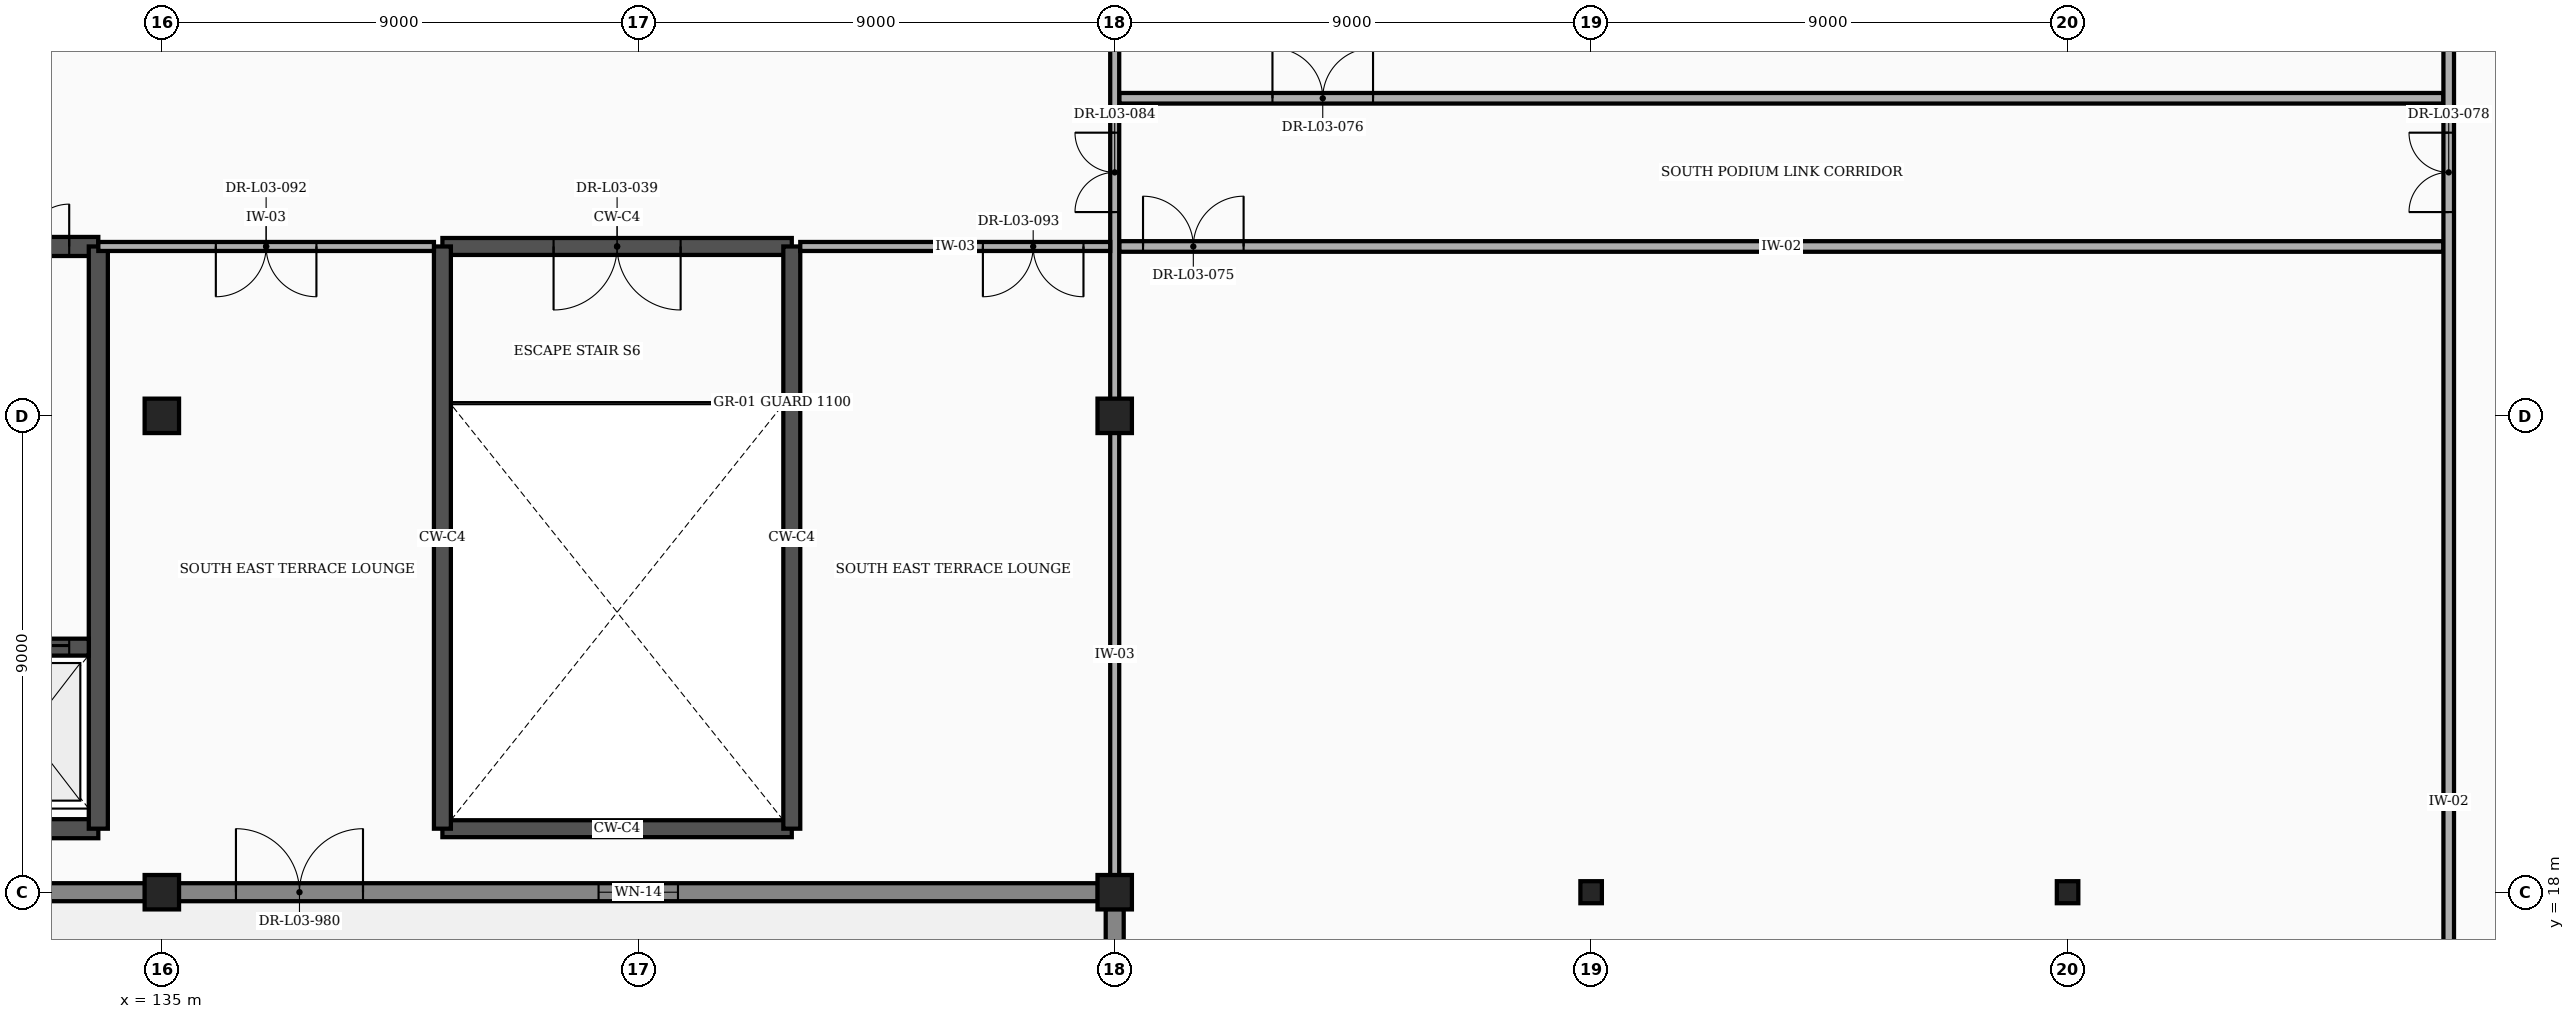
"""IFC4 building model, lengths in metres.
Left out: names, types, materials, properties, quantities, classifications, styles, units other than length and angle.
Written with IfcOpenShell. Run it as: python <this file> out.ifc"""

import sys

from ifc_helpers import new_model, si_unit, direction, frame, frame_2d, origin, origin_2d, place, context, subcontext, project, spatial, rectangle, i_section, extrude, element, fill, save


model = new_model("IFC4")
c1 = context("Model", 3, precision=1e-05, world=origin(), true_north=direction((0.0, 1.0)))
c2 = subcontext(c1, "Body", "Model", "MODEL_VIEW")
j1 = project(units=[si_unit("LENGTHUNIT", "METRE"), si_unit("PLANEANGLEUNIT", "RADIAN")], contexts=[c1])
p1 = place(None, origin())
s1 = spatial("IfcSite", under=j1, at=p1, CompositionType="ELEMENT")
p2 = place(p1, origin())
s2 = spatial("IfcBuilding", under=s1, at=p2, CompositionType="ELEMENT")
p3 = place(p2, frame((0.0, 0.0, 16.8)))
s3 = spatial("IfcBuildingStorey", under=s2, at=p3, CompositionType="ELEMENT", Elevation=16.8)
for number, where, z_axis, x_axis in (
    (1, (135.0, 18.0, 0.0), (0.0, 0.0, 1.0), (1.0, 0.0, 0.0)),
    (2, (135.0, 27.0, 0.0), (0.0, 0.0, 1.0), (1.0, 0.0, 0.0)),
    (3, (153.0, 18.0, 0.0), (0.0, 0.0, 1.0), (1.0, 0.0, 0.0)),
    (4, (153.0, 27.0, 0.0), (0.0, 0.0, 1.0), (1.0, 0.0, 0.0)),
):
    element("IfcColumn", number, at=place(p3, frame(where, z_axis=z_axis, x_axis=x_axis)), inside=s3, PredefinedType="COLUMN", context=c2, shape_type="SweptSolid", body=[
        extrude(rectangle(XDim=0.65, YDim=0.65, at=origin_2d()), origin(), (0.0, 0.0, 1.0), 4.8),
    ])
for number, where, z_axis, x_axis in (
    (5, (162.0, 18.0, 0.0), (0.0, 0.0, 1.0), (1.0, 0.0, 0.0)),
    (6, (171.0, 18.0, 0.0), (0.0, 0.0, 1.0), (1.0, 0.0, 0.0)),
):
    element("IfcColumn", number, at=place(p3, frame(where, z_axis=z_axis, x_axis=x_axis)), inside=s3, PredefinedType="COLUMN", context=c2, shape_type="SweptSolid", body=[
        extrude(i_section(OverallWidth=0.406, OverallDepth=0.416, WebThickness=0.03, FlangeThickness=0.048, at=origin_2d()), origin(), (0.0, 0.0, 1.0), 4.8),
    ])
p4 = place(p3, frame((117.317, 18.0, 0.0), z_axis=(0.0, 0.0, 1.0), x_axis=(1.0, 0.0, 0.0)))
e7 = element("IfcWall", 7, at=p4, inside=s3, PredefinedType="STANDARD", context=c2, shape_type="SweptSolid", body=[
    extrude(rectangle(XDim=17.366, YDim=0.34, at=frame_2d((8.683, 0.0))), origin(), (0.0, 0.0, 1.0), 4.195),
])
p5 = place(p4, frame((7.933, 0.0, 0.85)))
e8 = element("IfcOpeningElement", 8, at=p5, cuts=e7, PredefinedType="OPENING", context=c2, shape_type="SweptSolid", body=[
    extrude(rectangle(XDim=1.5, YDim=1.8, at=frame_2d((0.75, 0.9))), frame((0.0, 0.182, 0.0), z_axis=(0.0, -1.0, 0.0), x_axis=(1.0, 0.0, 0.0)), (0.0, 0.0, 1.0), 0.364),
])
p6 = place(p3, frame((135.317, 18.0, 0.0), z_axis=(0.0, 0.0, 1.0), x_axis=(1.0, 0.0, 0.0)))
e9 = element("IfcWall", 9, at=p6, inside=s3, PredefinedType="STANDARD", context=c2, shape_type="SweptSolid", body=[
    extrude(rectangle(XDim=17.366, YDim=0.34, at=frame_2d((8.683, 0.0))), origin(), (0.0, 0.0, 1.0), 4.195),
])
p7 = place(p6, frame((7.933, 0.0, 0.85)))
e10 = element("IfcOpeningElement", 10, at=p7, cuts=e9, PredefinedType="OPENING", context=c2, shape_type="SweptSolid", body=[
    extrude(rectangle(XDim=1.5, YDim=1.8, at=frame_2d((0.75, 0.9))), frame((0.0, 0.182, 0.0), z_axis=(0.0, -1.0, 0.0), x_axis=(1.0, 0.0, 0.0)), (0.0, 0.0, 1.0), 0.364),
])
p8 = place(p6, frame((1.083, 0.0, 0.0)))
e11 = element("IfcOpeningElement", 11, at=p8, cuts=e9, PredefinedType="OPENING", context=c2, shape_type="SweptSolid", body=[
    extrude(rectangle(XDim=2.4, YDim=2.35, at=frame_2d((1.2, 1.175))), frame((0.0, 0.182, 0.0), z_axis=(0.0, -1.0, 0.0), x_axis=(1.0, 0.0, 0.0)), (0.0, 0.0, 1.0), 0.364),
])
p9 = place(p3, frame((153.0, 9.317, 0.0), z_axis=(0.0, 0.0, 1.0), x_axis=(0.0, 1.0, 0.0)))
e12 = element("IfcWall", 12, at=p9, inside=s3, PredefinedType="STANDARD", context=c2, shape_type="SweptSolid", body=[
    extrude(rectangle(XDim=8.366, YDim=0.34, at=frame_2d((4.183, 0.0))), origin(), (0.0, 0.0, 1.0), 4.555),
])
p10 = place(p9, frame((2.583, 0.0, 0.85)))
e13 = element("IfcOpeningElement", 13, at=p10, cuts=e12, PredefinedType="OPENING", context=c2, shape_type="SweptSolid", body=[
    extrude(rectangle(XDim=3.2, YDim=2.2, at=frame_2d((1.6, 1.1))), frame((0.0, 0.182, 0.0), z_axis=(0.0, -1.0, 0.0), x_axis=(1.0, 0.0, 0.0)), (0.0, 0.0, 1.0), 0.364),
])
p11 = place(p3, frame((127.2, 19.2, 0.0), z_axis=(0.0, 0.0, 1.0), x_axis=(1.0, 0.0, 0.0)))
e14 = element("IfcWall", 14, at=p11, inside=s3, PredefinedType="SHEAR", context=c2, shape_type="SweptSolid", body=[
    extrude(rectangle(XDim=6.6, YDim=0.36, at=frame_2d((3.3, 0.0))), origin(), (0.0, 0.0, 1.0), 4.555),
])
p12 = place(p3, frame((127.2, 30.2, 0.0), z_axis=(0.0, 0.0, 1.0), x_axis=(1.0, 0.0, 0.0)))
e15 = element("IfcWall", 15, at=p12, inside=s3, PredefinedType="SHEAR", context=c2, shape_type="SweptSolid", body=[
    extrude(rectangle(XDim=6.6, YDim=0.36, at=frame_2d((3.3, 0.0))), origin(), (0.0, 0.0, 1.0), 4.555),
])
p13 = place(p12, frame((4.45, 0.0, 0.0)))
e16 = element("IfcOpeningElement", 16, at=p13, cuts=e15, PredefinedType="OPENING", context=c2, shape_type="SweptSolid", body=[
    extrude(rectangle(XDim=1.6, YDim=2.3, at=frame_2d((0.8, 1.15))), frame((0.0, 0.192, 0.0), z_axis=(0.0, -1.0, 0.0), x_axis=(1.0, 0.0, 0.0)), (0.0, 0.0, 1.0), 0.384),
])
p14 = place(p3, frame((133.8, 19.2, 0.0), z_axis=(0.0, 0.0, 1.0), x_axis=(0.0, 1.0, 0.0)))
e17 = element("IfcWall", 17, at=p14, inside=s3, PredefinedType="SHEAR", context=c2, shape_type="SweptSolid", body=[
    extrude(rectangle(XDim=11.0, YDim=0.36, at=frame_2d((5.5, 0.0))), origin(), (0.0, 0.0, 1.0), 4.555),
])
p15 = place(p3, frame((131.3, 22.63, 0.0), z_axis=(0.0, 0.0, 1.0), x_axis=(1.0, 0.0, 0.0)))
e18 = element("IfcWall", 18, at=p15, inside=s3, PredefinedType="SHEAR", context=c2, shape_type="SweptSolid", body=[
    extrude(rectangle(XDim=2.32, YDim=0.32, at=frame_2d((1.16, 0.0))), origin(), (0.0, 0.0, 1.0), 4.555),
])
p16 = place(p15, frame((0.3, 0.0, 0.0)))
e19 = element("IfcOpeningElement", 19, at=p16, cuts=e18, PredefinedType="OPENING", context=c2, shape_type="SweptSolid", body=[
    extrude(rectangle(XDim=1.65, YDim=2.35, at=frame_2d((0.825, 1.175))), frame((0.0, 0.172, 0.0), z_axis=(0.0, -1.0, 0.0), x_axis=(1.0, 0.0, 0.0)), (0.0, 0.0, 1.0), 0.344),
])
p17 = place(p3, frame((140.3, 19.2, 0.0), z_axis=(0.0, 0.0, 1.0), x_axis=(1.0, 0.0, 0.0)))
e20 = element("IfcWall", 20, at=p17, inside=s3, PredefinedType="SHEAR", context=c2, shape_type="SweptSolid", body=[
    extrude(rectangle(XDim=6.6, YDim=0.32, at=frame_2d((3.3, 0.0))), origin(), (0.0, 0.0, 1.0), 4.555),
])
p18 = place(p3, frame((140.3, 30.2, 0.0), z_axis=(0.0, 0.0, 1.0), x_axis=(1.0, 0.0, 0.0)))
e21 = element("IfcWall", 21, at=p18, inside=s3, PredefinedType="SHEAR", context=c2, shape_type="SweptSolid", body=[
    extrude(rectangle(XDim=6.6, YDim=0.32, at=frame_2d((3.3, 0.0))), origin(), (0.0, 0.0, 1.0), 4.555),
])
p19 = place(p18, frame((2.1, 0.0, 0.0)))
e22 = element("IfcOpeningElement", 22, at=p19, cuts=e21, PredefinedType="OPENING", context=c2, shape_type="SweptSolid", body=[
    extrude(rectangle(XDim=2.4, YDim=2.25, at=frame_2d((1.2, 1.125))), frame((0.0, 0.172, 0.0), z_axis=(0.0, -1.0, 0.0), x_axis=(1.0, 0.0, 0.0)), (0.0, 0.0, 1.0), 0.344),
])
for number, where, z_axis, x_axis in (
    (23, (140.3, 19.2, 0.0), (0.0, 0.0, 1.0), (0.0, 1.0, 0.0)),
    (24, (146.9, 19.2, 0.0), (0.0, 0.0, 1.0), (0.0, 1.0, 0.0)),
):
    element("IfcWall", number, at=place(p3, frame(where, z_axis=z_axis, x_axis=x_axis)), inside=s3, PredefinedType="SHEAR", context=c2, shape_type="SweptSolid", body=[
        extrude(rectangle(XDim=11.0, YDim=0.32, at=frame_2d((5.5, 0.0))), origin(), (0.0, 0.0, 1.0), 4.555),
    ])
p20 = place(p3, frame((153.085, 30.2, 0.0), z_axis=(0.0, 0.0, 1.0), x_axis=(1.0, 0.0, 0.0)))
e25 = element("IfcWall", 25, at=p20, inside=s3, PredefinedType="PARTITIONING", context=c2, shape_type="SweptSolid", body=[
    extrude(rectangle(XDim=25.015, YDim=0.2, at=frame_2d((12.508, 0.0))), origin(), (0.0, 0.0, 1.0), 4.555),
])
p21 = place(p20, frame((0.45, 0.0, 0.0)))
e26 = element("IfcOpeningElement", 26, at=p21, cuts=e25, PredefinedType="OPENING", context=c2, shape_type="SweptSolid", body=[
    extrude(rectangle(XDim=1.9, YDim=2.35, at=frame_2d((0.95, 1.175))), frame((0.0, 0.112, 0.0), z_axis=(0.0, -1.0, 0.0), x_axis=(1.0, 0.0, 0.0)), (0.0, 0.0, 1.0), 0.224),
])
p22 = place(p3, frame((153.085, 33.0, 0.0), z_axis=(0.0, 0.0, 1.0), x_axis=(1.0, 0.0, 0.0)))
e27 = element("IfcWall", 27, at=p22, inside=s3, PredefinedType="PARTITIONING", context=c2, shape_type="SweptSolid", body=[
    extrude(rectangle(XDim=25.015, YDim=0.2, at=frame_2d((12.508, 0.0))), origin(), (0.0, 0.0, 1.0), 4.555),
])
p23 = place(p22, frame((2.895, 0.0, 0.0)))
e28 = element("IfcOpeningElement", 28, at=p23, cuts=e27, PredefinedType="OPENING", context=c2, shape_type="SweptSolid", body=[
    extrude(rectangle(XDim=1.9, YDim=2.35, at=frame_2d((0.95, 1.175))), frame((0.0, 0.112, 0.0), z_axis=(0.0, -1.0, 0.0), x_axis=(1.0, 0.0, 0.0)), (0.0, 0.0, 1.0), 0.224),
])
p24 = place(p3, frame((178.2, 0.17, 0.0), z_axis=(0.0, 0.0, 1.0), x_axis=(0.0, 1.0, 0.0)))
e29 = element("IfcWall", 29, at=p24, inside=s3, PredefinedType="PARTITIONING", context=c2, shape_type="SweptSolid", body=[
    extrude(rectangle(XDim=39.07, YDim=0.2, at=frame_2d((19.535, 0.0))), origin(), (0.0, 0.0, 1.0), 4.555),
])
p25 = place(p24, frame((13.98, 0.0, 0.0)))
e30 = element("IfcOpeningElement", 30, at=p25, cuts=e29, PredefinedType="OPENING", context=c2, shape_type="SweptSolid", body=[
    extrude(rectangle(XDim=1.9, YDim=2.35, at=frame_2d((0.95, 1.175))), frame((0.0, 0.112, 0.0), z_axis=(0.0, -1.0, 0.0), x_axis=(1.0, 0.0, 0.0)), (0.0, 0.0, 1.0), 0.224),
])
p26 = place(p24, frame((30.68, 0.0, 0.0)))
e31 = element("IfcOpeningElement", 31, at=p26, cuts=e29, PredefinedType="OPENING", context=c2, shape_type="SweptSolid", body=[
    extrude(rectangle(XDim=1.5, YDim=2.2, at=frame_2d((0.75, 1.1))), frame((0.0, 0.112, 0.0), z_axis=(0.0, -1.0, 0.0), x_axis=(1.0, 0.0, 0.0)), (0.0, 0.0, 1.0), 0.224),
])
p27 = place(p24, frame((36.68, 0.0, 0.0)))
e32 = element("IfcOpeningElement", 32, at=p27, cuts=e29, PredefinedType="OPENING", context=c2, shape_type="SweptSolid", body=[
    extrude(rectangle(XDim=1.9, YDim=2.35, at=frame_2d((0.95, 1.175))), frame((0.0, 0.112, 0.0), z_axis=(0.0, -1.0, 0.0), x_axis=(1.0, 0.0, 0.0)), (0.0, 0.0, 1.0), 0.224),
])
p28 = place(p3, frame((153.0, 18.22, 0.0), z_axis=(0.0, 0.0, 1.0), x_axis=(0.0, 1.0, 0.0)))
e33 = element("IfcWall", 33, at=p28, inside=s3, PredefinedType="PARTITIONING", context=c2, shape_type="SweptSolid", body=[
    extrude(rectangle(XDim=8.56, YDim=0.17, at=frame_2d((4.28, 0.0))), origin(), (0.0, 0.0, 1.0), 4.002),
])
p29 = place(p3, frame((153.0, 27.22, 0.0), z_axis=(0.0, 0.0, 1.0), x_axis=(0.0, 1.0, 0.0)))
e34 = element("IfcWall", 34, at=p29, inside=s3, PredefinedType="PARTITIONING", context=c2, shape_type="SweptSolid", body=[
    extrude(rectangle(XDim=8.56, YDim=0.17, at=frame_2d((4.28, 0.0))), origin(), (0.0, 0.0, 1.0), 4.258),
])
p30 = place(p29, frame((3.63, 0.0, 0.0)))
e35 = element("IfcOpeningElement", 35, at=p30, cuts=e34, PredefinedType="OPENING", context=c2, shape_type="SweptSolid", body=[
    extrude(rectangle(XDim=1.5, YDim=2.2, at=frame_2d((0.75, 1.1))), frame((0.0, 0.097, 0.0), z_axis=(0.0, -1.0, 0.0), x_axis=(1.0, 0.0, 0.0)), (0.0, 0.0, 1.0), 0.194),
])
p31 = place(p3, frame((133.8, 30.2, 0.0), z_axis=(0.0, 0.0, 1.0), x_axis=(1.0, 0.0, 0.0)))
e36 = element("IfcWall", 36, at=p31, inside=s3, PredefinedType="PARTITIONING", context=c2, shape_type="SweptSolid", body=[
    extrude(rectangle(XDim=6.34, YDim=0.17, at=frame_2d((3.17, 0.0))), origin(), (0.0, 0.0, 1.0), 4.555),
])
p32 = place(p31, frame((2.22, 0.0, 0.0)))
e37 = element("IfcOpeningElement", 37, at=p32, cuts=e36, PredefinedType="OPENING", context=c2, shape_type="SweptSolid", body=[
    extrude(rectangle(XDim=1.9, YDim=2.35, at=frame_2d((0.95, 1.175))), frame((0.0, 0.097, 0.0), z_axis=(0.0, -1.0, 0.0), x_axis=(1.0, 0.0, 0.0)), (0.0, 0.0, 1.0), 0.194),
])
p33 = place(p3, frame((147.06, 30.2, 0.0), z_axis=(0.0, 0.0, 1.0), x_axis=(1.0, 0.0, 0.0)))
e38 = element("IfcWall", 38, at=p33, inside=s3, PredefinedType="PARTITIONING", context=c2, shape_type="SweptSolid", body=[
    extrude(rectangle(XDim=5.855, YDim=0.17, at=frame_2d((2.927, 0.0))), origin(), (0.0, 0.0, 1.0), 4.555),
])
p34 = place(p33, frame((3.45, 0.0, 0.0)))
e39 = element("IfcOpeningElement", 39, at=p34, cuts=e38, PredefinedType="OPENING", context=c2, shape_type="SweptSolid", body=[
    extrude(rectangle(XDim=1.9, YDim=2.35, at=frame_2d((0.95, 1.175))), frame((0.0, 0.097, 0.0), z_axis=(0.0, -1.0, 0.0), x_axis=(1.0, 0.0, 0.0)), (0.0, 0.0, 1.0), 0.194),
])
p35 = place(p7, origin())
e40 = element("IfcWindow", 40, at=p35, inside=s3, PartitioningType="SINGLE_PANEL", PredefinedType="WINDOW", context=c2, shape_type="SweptSolid", body=[
    extrude(rectangle(XDim=1.5, YDim=1.8, at=frame_2d((0.75, 0.9))), frame((0.0, 0.03, 0.0), z_axis=(0.0, -1.0, 0.0), x_axis=(1.0, 0.0, 0.0)), (0.0, 0.0, 1.0), 0.06),
])
fill(e10, e40)
p36 = place(p8, origin())
e41 = element("IfcDoor", 41, at=p36, inside=s3, OperationType="DOUBLE_DOOR_SINGLE_SWING", PredefinedType="DOOR", context=c2, shape_type="SweptSolid", body=[
    extrude(rectangle(XDim=2.4, YDim=2.35, at=frame_2d((1.2, 1.175))), frame((0.0, 0.025, 0.0), z_axis=(0.0, -1.0, 0.0), x_axis=(1.0, 0.0, 0.0)), (0.0, 0.0, 1.0), 0.05),
])
fill(e11, e41)
p37 = place(p16, origin())
e42 = element("IfcDoor", 42, at=p37, inside=s3, OperationType="DOUBLE_DOOR_SLIDING", PredefinedType="DOOR", context=c2, shape_type="SweptSolid", body=[
    extrude(rectangle(XDim=1.65, YDim=2.35, at=frame_2d((0.825, 1.175))), frame((0.0, 0.025, 0.0), z_axis=(0.0, -1.0, 0.0), x_axis=(1.0, 0.0, 0.0)), (0.0, 0.0, 1.0), 0.05),
])
fill(e19, e42)
p38 = place(p13, origin())
e43 = element("IfcDoor", 43, at=p38, inside=s3, OperationType="DOUBLE_DOOR_SINGLE_SWING", PredefinedType="DOOR", context=c2, shape_type="SweptSolid", body=[
    extrude(rectangle(XDim=1.6, YDim=2.3, at=frame_2d((0.8, 1.15))), frame((0.0, 0.025, 0.0), z_axis=(0.0, -1.0, 0.0), x_axis=(1.0, 0.0, 0.0)), (0.0, 0.0, 1.0), 0.05),
])
fill(e16, e43)
p39 = place(p19, frame((2.4, 0.0, 0.0), z_axis=(0.0, 0.0, 1.0), x_axis=(-1.0, 0.0, 0.0)))
e44 = element("IfcDoor", 44, at=p39, inside=s3, OperationType="DOUBLE_DOOR_SINGLE_SWING", PredefinedType="DOOR", context=c2, shape_type="SweptSolid", body=[
    extrude(rectangle(XDim=2.4, YDim=2.25, at=frame_2d((1.2, 1.125))), frame((0.0, 0.025, 0.0), z_axis=(0.0, -1.0, 0.0), x_axis=(1.0, 0.0, 0.0)), (0.0, 0.0, 1.0), 0.05),
])
fill(e22, e44)
p40 = place(p21, origin())
e45 = element("IfcDoor", 45, at=p40, inside=s3, OperationType="DOUBLE_DOOR_SINGLE_SWING", PredefinedType="DOOR", context=c2, shape_type="SweptSolid", body=[
    extrude(rectangle(XDim=1.9, YDim=2.35, at=frame_2d((0.95, 1.175))), frame((0.0, 0.025, 0.0), z_axis=(0.0, -1.0, 0.0), x_axis=(1.0, 0.0, 0.0)), (0.0, 0.0, 1.0), 0.05),
])
fill(e26, e45)
p41 = place(p23, origin())
e46 = element("IfcDoor", 46, at=p41, inside=s3, OperationType="DOUBLE_DOOR_SINGLE_SWING", PredefinedType="DOOR", context=c2, shape_type="SweptSolid", body=[
    extrude(rectangle(XDim=1.9, YDim=2.35, at=frame_2d((0.95, 1.175))), frame((0.0, 0.025, 0.0), z_axis=(0.0, -1.0, 0.0), x_axis=(1.0, 0.0, 0.0)), (0.0, 0.0, 1.0), 0.05),
])
fill(e28, e46)
p42 = place(p26, origin())
e47 = element("IfcDoor", 47, at=p42, inside=s3, OperationType="DOUBLE_DOOR_SINGLE_SWING", PredefinedType="DOOR", context=c2, shape_type="SweptSolid", body=[
    extrude(rectangle(XDim=1.5, YDim=2.2, at=frame_2d((0.75, 1.1))), frame((0.0, 0.025, 0.0), z_axis=(0.0, -1.0, 0.0), x_axis=(1.0, 0.0, 0.0)), (0.0, 0.0, 1.0), 0.05),
])
fill(e31, e47)
p43 = place(p30, origin())
e48 = element("IfcDoor", 48, at=p43, inside=s3, OperationType="DOUBLE_DOOR_SINGLE_SWING", PredefinedType="DOOR", context=c2, shape_type="SweptSolid", body=[
    extrude(rectangle(XDim=1.5, YDim=2.2, at=frame_2d((0.75, 1.1))), frame((0.0, 0.025, 0.0), z_axis=(0.0, -1.0, 0.0), x_axis=(1.0, 0.0, 0.0)), (0.0, 0.0, 1.0), 0.05),
])
fill(e35, e48)
p44 = place(p32, frame((1.9, 0.0, 0.0), z_axis=(0.0, 0.0, 1.0), x_axis=(-1.0, 0.0, 0.0)))
e49 = element("IfcDoor", 49, at=p44, inside=s3, OperationType="DOUBLE_DOOR_SINGLE_SWING", PredefinedType="DOOR", context=c2, shape_type="SweptSolid", body=[
    extrude(rectangle(XDim=1.9, YDim=2.35, at=frame_2d((0.95, 1.175))), frame((0.0, 0.025, 0.0), z_axis=(0.0, -1.0, 0.0), x_axis=(1.0, 0.0, 0.0)), (0.0, 0.0, 1.0), 0.05),
])
fill(e37, e49)
p45 = place(p34, frame((1.9, 0.0, 0.0), z_axis=(0.0, 0.0, 1.0), x_axis=(-1.0, 0.0, 0.0)))
e50 = element("IfcDoor", 50, at=p45, inside=s3, OperationType="DOUBLE_DOOR_SINGLE_SWING", PredefinedType="DOOR", context=c2, shape_type="SweptSolid", body=[
    extrude(rectangle(XDim=1.9, YDim=2.35, at=frame_2d((0.95, 1.175))), frame((0.0, 0.025, 0.0), z_axis=(0.0, -1.0, 0.0), x_axis=(1.0, 0.0, 0.0)), (0.0, 0.0, 1.0), 0.05),
])
fill(e39, e50)
save(model, sys.argv[1])
